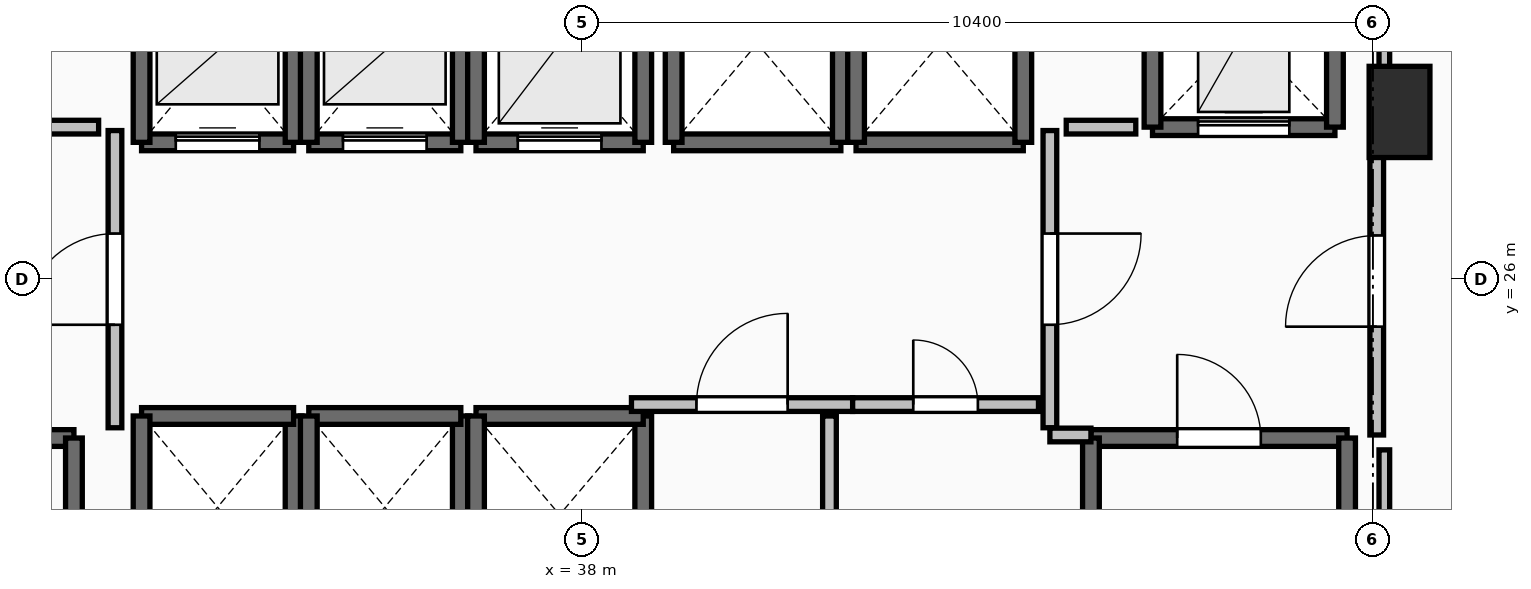
"""IFC4 building model, lengths in metres.
Left out: names, types, materials, properties, quantities, classifications, styles, units other than length and angle.
Written with IfcOpenShell. Run it as: python <this file> out.ifc"""

import sys

from ifc_helpers import new_model, si_unit, direction, frame, frame_2d, origin, origin_2d, place, context, subcontext, project, spatial, rectangle, extrude, element, fill, save


model = new_model("IFC4")
c1 = context("Model", 3, precision=1e-05, world=origin(), true_north=direction((0.0, 1.0)))
c2 = subcontext(c1, "Body", "Model", "MODEL_VIEW")
j1 = project(units=[si_unit("LENGTHUNIT", "METRE"), si_unit("PLANEANGLEUNIT", "RADIAN")], contexts=[c1])
p1 = place(None, origin())
s1 = spatial("IfcSite", under=j1, at=p1, CompositionType="ELEMENT")
p2 = place(p1, origin())
s2 = spatial("IfcBuilding", under=s1, at=p2, CompositionType="ELEMENT")
p3 = place(p2, frame((0.0, 0.0, 92.8)))
s3 = spatial("IfcBuildingStorey", under=s2, at=p3, CompositionType="ELEMENT", Elevation=92.8)
p4 = place(p3, frame((48.75, 28.2, 0.0), z_axis=(0.0, 0.0, 1.0), x_axis=(1.0, 0.0, 0.0)))
e1 = element("IfcColumn", 1, at=p4, inside=s3, PredefinedType="PILASTER", context=c2, shape_type="SweptSolid", body=[
    extrude(rectangle(XDim=0.8, YDim=1.2, at=origin_2d()), origin(), (0.0, 0.0, 1.0), 3.5),
])
p5 = place(p3, frame((27.94, 23.91, 0.0), z_axis=(0.0, 0.0, 1.0), x_axis=(1.0, 0.0, 0.0)))
e2 = element("IfcWall", 2, at=p5, inside=s3, PredefinedType="SOLIDWALL", context=c2, shape_type="SweptSolid", body=[
    extrude(rectangle(XDim=3.37, YDim=0.22, at=frame_2d((1.685, 0.0))), origin(), (0.0, 0.0, 1.0), 3.24),
])
p6 = place(p5, frame((1.135, 0.0, 0.0)))
e3 = element("IfcOpeningElement", 3, at=p6, cuts=e2, PredefinedType="OPENING", context=c2, shape_type="SweptSolid", body=[
    extrude(rectangle(XDim=1.1, YDim=2.15, at=frame_2d((0.55, 1.075))), frame((0.0, 0.125, 0.0), z_axis=(0.0, -1.0, 0.0), x_axis=(1.0, 0.0, 0.0)), (0.0, 0.0, 1.0), 0.25),
])
p7 = place(p3, frame((31.31, 23.91, 0.0), z_axis=(0.0, 0.0, 1.0), x_axis=(0.0, -1.0, 0.0)))
e4 = element("IfcWall", 4, at=p7, inside=s3, PredefinedType="SOLIDWALL", context=c2, shape_type="SweptSolid", body=[
    extrude(rectangle(XDim=7.42, YDim=0.22, at=frame_2d((3.71, 0.0))), origin(), (0.0, 0.0, 1.0), 3.24),
])
p8 = place(p3, frame((44.69, 23.91, 0.0), z_axis=(0.0, 0.0, 1.0), x_axis=(1.0, 0.0, 0.0)))
e5 = element("IfcWall", 5, at=p8, inside=s3, PredefinedType="SOLIDWALL", context=c2, shape_type="SweptSolid", body=[
    extrude(rectangle(XDim=3.37, YDim=0.22, at=frame_2d((1.685, 0.0))), origin(), (0.0, 0.0, 1.0), 3.24),
])
p9 = place(p8, frame((1.135, 0.0, 0.0)))
e6 = element("IfcOpeningElement", 6, at=p9, cuts=e5, PredefinedType="OPENING", context=c2, shape_type="SweptSolid", body=[
    extrude(rectangle(XDim=1.1, YDim=2.15, at=frame_2d((0.55, 1.075))), frame((0.0, 0.125, 0.0), z_axis=(0.0, -1.0, 0.0), x_axis=(1.0, 0.0, 0.0)), (0.0, 0.0, 1.0), 0.25),
])
for number, where, z_axis, x_axis in (
    (7, (48.06, 23.91, 0.0), (0.0, 0.0, 1.0), (0.0, -1.0, 0.0)),
    (8, (44.69, 16.49, 0.0), (0.0, 0.0, 1.0), (0.0, 1.0, 0.0)),
):
    element("IfcWall", number, at=place(p3, frame(where, z_axis=z_axis, x_axis=x_axis)), inside=s3, PredefinedType="SOLIDWALL", context=c2, shape_type="SweptSolid", body=[
        extrude(rectangle(XDim=7.42, YDim=0.22, at=frame_2d((3.71, 0.0))), origin(), (0.0, 0.0, 1.0), 3.24),
    ])
p10 = place(p3, frame((32.2, 27.8, 0.0), z_axis=(0.0, 0.0, 1.0), x_axis=(1.0, 0.0, 0.0)))
e9 = element("IfcWall", 9, at=p10, inside=s3, PredefinedType="SOLIDWALL", context=c2, shape_type="SweptSolid", body=[
    extrude(rectangle(XDim=2.0, YDim=0.22, at=frame_2d((1.0, 0.0))), origin(), (0.0, 0.0, 1.0), 3.24),
])
p11 = place(p10, frame((0.45, 0.0, 0.0)))
e10 = element("IfcOpeningElement", 10, at=p11, cuts=e9, PredefinedType="OPENING", context=c2, shape_type="SweptSolid", body=[
    extrude(rectangle(XDim=1.1, YDim=2.2, at=frame_2d((0.55, 1.1))), frame((0.0, 0.125, 0.0), z_axis=(0.0, -1.0, 0.0), x_axis=(1.0, 0.0, 0.0)), (0.0, 0.0, 1.0), 0.25),
])
for number, where, z_axis, x_axis in (
    (11, (34.2, 27.8, 0.0), (0.0, 0.0, 1.0), (0.0, 1.0, 0.0)),
    (12, (32.2, 30.2, 0.0), (0.0, 0.0, 1.0), (0.0, -1.0, 0.0)),
):
    element("IfcWall", number, at=place(p3, frame(where, z_axis=z_axis, x_axis=x_axis)), inside=s3, PredefinedType="SOLIDWALL", context=c2, shape_type="SweptSolid", body=[
        extrude(rectangle(XDim=2.4, YDim=0.22, at=frame_2d((1.2, 0.0))), origin(), (0.0, 0.0, 1.0), 3.24),
    ])
p12 = place(p3, frame((34.4, 27.8, 0.0), z_axis=(0.0, 0.0, 1.0), x_axis=(1.0, 0.0, 0.0)))
e13 = element("IfcWall", 13, at=p12, inside=s3, PredefinedType="SOLIDWALL", context=c2, shape_type="SweptSolid", body=[
    extrude(rectangle(XDim=2.0, YDim=0.22, at=frame_2d((1.0, 0.0))), origin(), (0.0, 0.0, 1.0), 3.24),
])
p13 = place(p12, frame((0.45, 0.0, 0.0)))
e14 = element("IfcOpeningElement", 14, at=p13, cuts=e13, PredefinedType="OPENING", context=c2, shape_type="SweptSolid", body=[
    extrude(rectangle(XDim=1.1, YDim=2.2, at=frame_2d((0.55, 1.1))), frame((0.0, 0.125, 0.0), z_axis=(0.0, -1.0, 0.0), x_axis=(1.0, 0.0, 0.0)), (0.0, 0.0, 1.0), 0.25),
])
for number, where, z_axis, x_axis in (
    (15, (36.4, 27.8, 0.0), (0.0, 0.0, 1.0), (0.0, 1.0, 0.0)),
    (16, (34.4, 30.2, 0.0), (0.0, 0.0, 1.0), (0.0, -1.0, 0.0)),
):
    element("IfcWall", number, at=place(p3, frame(where, z_axis=z_axis, x_axis=x_axis)), inside=s3, PredefinedType="SOLIDWALL", context=c2, shape_type="SweptSolid", body=[
        extrude(rectangle(XDim=2.4, YDim=0.22, at=frame_2d((1.2, 0.0))), origin(), (0.0, 0.0, 1.0), 3.24),
    ])
p14 = place(p3, frame((36.6, 27.8, 0.0), z_axis=(0.0, 0.0, 1.0), x_axis=(1.0, 0.0, 0.0)))
e17 = element("IfcWall", 17, at=p14, inside=s3, PredefinedType="SOLIDWALL", context=c2, shape_type="SweptSolid", body=[
    extrude(rectangle(XDim=2.2, YDim=0.22, at=frame_2d((1.1, 0.0))), origin(), (0.0, 0.0, 1.0), 3.24),
])
p15 = place(p14, frame((0.55, 0.0, 0.0)))
e18 = element("IfcOpeningElement", 18, at=p15, cuts=e17, PredefinedType="OPENING", context=c2, shape_type="SweptSolid", body=[
    extrude(rectangle(XDim=1.1, YDim=2.2, at=frame_2d((0.55, 1.1))), frame((0.0, 0.125, 0.0), z_axis=(0.0, -1.0, 0.0), x_axis=(1.0, 0.0, 0.0)), (0.0, 0.0, 1.0), 0.25),
])
for number, where, z_axis, x_axis in (
    (19, (38.8, 27.8, 0.0), (0.0, 0.0, 1.0), (0.0, 1.0, 0.0)),
    (20, (36.6, 30.4, 0.0), (0.0, 0.0, 1.0), (0.0, -1.0, 0.0)),
):
    element("IfcWall", number, at=place(p3, frame(where, z_axis=z_axis, x_axis=x_axis)), inside=s3, PredefinedType="SOLIDWALL", context=c2, shape_type="SweptSolid", body=[
        extrude(rectangle(XDim=2.6, YDim=0.22, at=frame_2d((1.3, 0.0))), origin(), (0.0, 0.0, 1.0), 3.24),
    ])
p16 = place(p3, frame((34.2, 21.8, 0.0), z_axis=(0.0, 0.0, 1.0), x_axis=(0.0, 1.0, 0.0)))
e21 = element("IfcWall", 21, at=p16, inside=s3, PredefinedType="SOLIDWALL", context=c2, shape_type="SweptSolid", body=[
    extrude(rectangle(XDim=2.4, YDim=0.22, at=frame_2d((1.2, 0.0))), origin(), (0.0, 0.0, 1.0), 3.24),
])
p17 = place(p3, frame((34.2, 24.2, 0.0), z_axis=(0.0, 0.0, 1.0), x_axis=(-1.0, 0.0, 0.0)))
e22 = element("IfcWall", 22, at=p17, inside=s3, PredefinedType="SOLIDWALL", context=c2, shape_type="SweptSolid", body=[
    extrude(rectangle(XDim=2.0, YDim=0.22, at=frame_2d((1.0, 0.0))), origin(), (0.0, 0.0, 1.0), 3.24),
])
for number, where, z_axis, x_axis in (
    (23, (32.2, 24.2, 0.0), (0.0, 0.0, 1.0), (0.0, -1.0, 0.0)),
    (24, (36.4, 21.8, 0.0), (0.0, 0.0, 1.0), (0.0, 1.0, 0.0)),
):
    element("IfcWall", number, at=place(p3, frame(where, z_axis=z_axis, x_axis=x_axis)), inside=s3, PredefinedType="SOLIDWALL", context=c2, shape_type="SweptSolid", body=[
        extrude(rectangle(XDim=2.4, YDim=0.22, at=frame_2d((1.2, 0.0))), origin(), (0.0, 0.0, 1.0), 3.24),
    ])
p18 = place(p3, frame((36.4, 24.2, 0.0), z_axis=(0.0, 0.0, 1.0), x_axis=(-1.0, 0.0, 0.0)))
e25 = element("IfcWall", 25, at=p18, inside=s3, PredefinedType="SOLIDWALL", context=c2, shape_type="SweptSolid", body=[
    extrude(rectangle(XDim=2.0, YDim=0.22, at=frame_2d((1.0, 0.0))), origin(), (0.0, 0.0, 1.0), 3.24),
])
p19 = place(p3, frame((34.4, 24.2, 0.0), z_axis=(0.0, 0.0, 1.0), x_axis=(0.0, -1.0, 0.0)))
e26 = element("IfcWall", 26, at=p19, inside=s3, PredefinedType="SOLIDWALL", context=c2, shape_type="SweptSolid", body=[
    extrude(rectangle(XDim=2.4, YDim=0.22, at=frame_2d((1.2, 0.0))), origin(), (0.0, 0.0, 1.0), 3.24),
])
p20 = place(p3, frame((38.8, 21.6, 0.0), z_axis=(0.0, 0.0, 1.0), x_axis=(0.0, 1.0, 0.0)))
e27 = element("IfcWall", 27, at=p20, inside=s3, PredefinedType="SOLIDWALL", context=c2, shape_type="SweptSolid", body=[
    extrude(rectangle(XDim=2.6, YDim=0.22, at=frame_2d((1.3, 0.0))), origin(), (0.0, 0.0, 1.0), 3.24),
])
p21 = place(p3, frame((38.8, 24.2, 0.0), z_axis=(0.0, 0.0, 1.0), x_axis=(-1.0, 0.0, 0.0)))
e28 = element("IfcWall", 28, at=p21, inside=s3, PredefinedType="SOLIDWALL", context=c2, shape_type="SweptSolid", body=[
    extrude(rectangle(XDim=2.2, YDim=0.22, at=frame_2d((1.1, 0.0))), origin(), (0.0, 0.0, 1.0), 3.24),
])
p22 = place(p3, frame((36.6, 24.2, 0.0), z_axis=(0.0, 0.0, 1.0), x_axis=(0.0, -1.0, 0.0)))
e29 = element("IfcWall", 29, at=p22, inside=s3, PredefinedType="SOLIDWALL", context=c2, shape_type="SweptSolid", body=[
    extrude(rectangle(XDim=2.6, YDim=0.22, at=frame_2d((1.3, 0.0))), origin(), (0.0, 0.0, 1.0), 3.24),
])
p23 = place(p3, frame((39.2, 27.8, 0.0), z_axis=(0.0, 0.0, 1.0), x_axis=(1.0, 0.0, 0.0)))
e30 = element("IfcWall", 30, at=p23, inside=s3, PredefinedType="SOLIDWALL", context=c2, shape_type="SweptSolid", body=[
    extrude(rectangle(XDim=2.2, YDim=0.22, at=frame_2d((1.1, 0.0))), origin(), (0.0, 0.0, 1.0), 3.24),
])
for number, where, z_axis, x_axis in (
    (31, (41.4, 27.8, 0.0), (0.0, 0.0, 1.0), (0.0, 1.0, 0.0)),
    (32, (39.2, 30.4, 0.0), (0.0, 0.0, 1.0), (0.0, -1.0, 0.0)),
):
    element("IfcWall", number, at=place(p3, frame(where, z_axis=z_axis, x_axis=x_axis)), inside=s3, PredefinedType="SOLIDWALL", context=c2, shape_type="SweptSolid", body=[
        extrude(rectangle(XDim=2.6, YDim=0.22, at=frame_2d((1.3, 0.0))), origin(), (0.0, 0.0, 1.0), 3.24),
    ])
p24 = place(p3, frame((41.6, 27.8, 0.0), z_axis=(0.0, 0.0, 1.0), x_axis=(1.0, 0.0, 0.0)))
e33 = element("IfcWall", 33, at=p24, inside=s3, PredefinedType="SOLIDWALL", context=c2, shape_type="SweptSolid", body=[
    extrude(rectangle(XDim=2.2, YDim=0.22, at=frame_2d((1.1, 0.0))), origin(), (0.0, 0.0, 1.0), 3.24),
])
for number, where, z_axis, x_axis in (
    (34, (43.8, 27.8, 0.0), (0.0, 0.0, 1.0), (0.0, 1.0, 0.0)),
    (35, (41.6, 30.4, 0.0), (0.0, 0.0, 1.0), (0.0, -1.0, 0.0)),
):
    element("IfcWall", number, at=place(p3, frame(where, z_axis=z_axis, x_axis=x_axis)), inside=s3, PredefinedType="SOLIDWALL", context=c2, shape_type="SweptSolid", body=[
        extrude(rectangle(XDim=2.6, YDim=0.22, at=frame_2d((1.3, 0.0))), origin(), (0.0, 0.0, 1.0), 3.24),
    ])
p25 = place(p3, frame((45.5, 28.0, 0.0), z_axis=(0.0, 0.0, 1.0), x_axis=(1.0, 0.0, 0.0)))
e36 = element("IfcWall", 36, at=p25, inside=s3, PredefinedType="SHEAR", context=c2, shape_type="SweptSolid", body=[
    extrude(rectangle(XDim=2.4, YDim=0.22, at=frame_2d((1.2, 0.0))), origin(), (0.0, 0.0, 1.0), 3.24),
])
p26 = place(p25, frame((0.6, 0.0, 0.0)))
e37 = element("IfcOpeningElement", 37, at=p26, cuts=e36, PredefinedType="OPENING", context=c2, shape_type="SweptSolid", body=[
    extrude(rectangle(XDim=1.2, YDim=2.2, at=frame_2d((0.6, 1.1))), frame((0.0, 0.125, 0.0), z_axis=(0.0, -1.0, 0.0), x_axis=(1.0, 0.0, 0.0)), (0.0, 0.0, 1.0), 0.25),
])
for number, where, z_axis, x_axis in (
    (38, (47.9, 28.0, 0.0), (0.0, 0.0, 1.0), (0.0, 1.0, 0.0)),
    (39, (45.5, 30.5, 0.0), (0.0, 0.0, 1.0), (0.0, -1.0, 0.0)),
):
    element("IfcWall", number, at=place(p3, frame(where, z_axis=z_axis, x_axis=x_axis)), inside=s3, PredefinedType="SHEAR", context=c2, shape_type="SweptSolid", body=[
        extrude(rectangle(XDim=2.5, YDim=0.22, at=frame_2d((1.25, 0.0))), origin(), (0.0, 0.0, 1.0), 3.24),
    ])
p27 = place(p3, frame((31.85, 24.045, 0.0), z_axis=(0.0, 0.0, 1.0), x_axis=(0.0, 1.0, 0.0)))
e40 = element("IfcWall", 40, at=p27, inside=s3, PredefinedType="PARTITIONING", context=c2, shape_type="SweptSolid", body=[
    extrude(rectangle(XDim=3.91, YDim=0.18, at=frame_2d((1.955, 0.0))), origin(), (0.0, 0.0, 1.0), 3.24),
])
p28 = place(p27, frame((1.355, 0.0, 0.0)))
e41 = element("IfcOpeningElement", 41, at=p28, cuts=e40, PredefinedType="OPENING", context=c2, shape_type="SweptSolid", body=[
    extrude(rectangle(XDim=1.2, YDim=2.15, at=frame_2d((0.6, 1.075))), frame((0.0, 0.105, 0.0), z_axis=(0.0, -1.0, 0.0), x_axis=(1.0, 0.0, 0.0)), (0.0, 0.0, 1.0), 0.21),
])
p29 = place(p3, frame((44.15, 27.955, 0.0), z_axis=(0.0, 0.0, 1.0), x_axis=(0.0, -1.0, 0.0)))
e42 = element("IfcWall", 42, at=p29, inside=s3, PredefinedType="PARTITIONING", context=c2, shape_type="SweptSolid", body=[
    extrude(rectangle(XDim=3.91, YDim=0.18, at=frame_2d((1.955, 0.0))), origin(), (0.0, 0.0, 1.0), 3.24),
])
p30 = place(p29, frame((1.355, 0.0, 0.0)))
e43 = element("IfcOpeningElement", 43, at=p30, cuts=e42, PredefinedType="OPENING", context=c2, shape_type="SweptSolid", body=[
    extrude(rectangle(XDim=1.2, YDim=2.15, at=frame_2d((0.6, 1.075))), frame((0.0, 0.105, 0.0), z_axis=(0.0, -1.0, 0.0), x_axis=(1.0, 0.0, 0.0)), (0.0, 0.0, 1.0), 0.21),
])
p31 = place(p3, frame((44.15, 23.95, 0.0), z_axis=(0.0, 0.0, 1.0), x_axis=(1.0, 0.0, 0.0)))
e44 = element("IfcWall", 44, at=p31, inside=s3, PredefinedType="PARTITIONING", context=c2, shape_type="SweptSolid", body=[
    extrude(rectangle(XDim=0.54, YDim=0.18, at=frame_2d((0.27, 0.0))), origin(), (0.0, 0.0, 1.0), 3.24),
])
p32 = place(p3, frame((48.45, 23.95, 0.0), z_axis=(0.0, 0.0, 1.0), x_axis=(0.0, 1.0, 0.0)))
e45 = element("IfcWall", 45, at=p32, inside=s3, PredefinedType="PARTITIONING", context=c2, shape_type="SweptSolid", body=[
    extrude(rectangle(XDim=4.05, YDim=0.18, at=frame_2d((2.025, 0.0))), origin(), (0.0, 0.0, 1.0), 3.24),
])
p33 = place(p32, frame((1.425, 0.0, 0.0)))
e46 = element("IfcOpeningElement", 46, at=p33, cuts=e45, PredefinedType="OPENING", context=c2, shape_type="SweptSolid", body=[
    extrude(rectangle(XDim=1.2, YDim=2.15, at=frame_2d((0.6, 1.075))), frame((0.0, 0.105, 0.0), z_axis=(0.0, -1.0, 0.0), x_axis=(1.0, 0.0, 0.0)), (0.0, 0.0, 1.0), 0.21),
])
p34 = place(p3, frame((38.645, 24.35, 0.0), z_axis=(0.0, 0.0, 1.0), x_axis=(1.0, 0.0, 0.0)))
e47 = element("IfcWall", 47, at=p34, inside=s3, PredefinedType="PARTITIONING", context=c2, shape_type="SweptSolid", body=[
    extrude(rectangle(XDim=2.91, YDim=0.18, at=frame_2d((1.455, 0.0))), origin(), (0.0, 0.0, 1.0), 3.24),
])
p35 = place(p34, frame((0.855, 0.0, 0.0)))
e48 = element("IfcOpeningElement", 48, at=p35, cuts=e47, PredefinedType="OPENING", context=c2, shape_type="SweptSolid", body=[
    extrude(rectangle(XDim=1.2, YDim=2.15, at=frame_2d((0.6, 1.075))), frame((0.0, 0.105, 0.0), z_axis=(0.0, -1.0, 0.0), x_axis=(1.0, 0.0, 0.0)), (0.0, 0.0, 1.0), 0.21),
])
p36 = place(p3, frame((41.555, 24.35, 0.0), z_axis=(0.0, 0.0, 1.0), x_axis=(1.0, 0.0, 0.0)))
e49 = element("IfcWall", 49, at=p36, inside=s3, PredefinedType="PARTITIONING", context=c2, shape_type="SweptSolid", body=[
    extrude(rectangle(XDim=2.445, YDim=0.18, at=frame_2d((1.223, 0.0))), origin(), (0.0, 0.0, 1.0), 3.24),
])
p37 = place(p36, frame((0.798, 0.0, 0.0)))
e50 = element("IfcOpeningElement", 50, at=p37, cuts=e49, PredefinedType="OPENING", context=c2, shape_type="SweptSolid", body=[
    extrude(rectangle(XDim=0.85, YDim=2.1, at=frame_2d((0.425, 1.05))), frame((0.0, 0.105, 0.0), z_axis=(0.0, -1.0, 0.0), x_axis=(1.0, 0.0, 0.0)), (0.0, 0.0, 1.0), 0.21),
])
p38 = place(p3, frame((41.25, 20.305, 0.0), z_axis=(0.0, 0.0, 1.0), x_axis=(0.0, 1.0, 0.0)))
e51 = element("IfcWall", 51, at=p38, inside=s3, PredefinedType="PARTITIONING", context=c2, shape_type="SweptSolid", body=[
    extrude(rectangle(XDim=3.895, YDim=0.18, at=frame_2d((1.948, 0.0))), origin(), (0.0, 0.0, 1.0), 3.24),
])
p39 = place(p38, frame((1.522, 0.0, 0.0)))
e52 = element("IfcOpeningElement", 52, at=p39, cuts=e51, PredefinedType="OPENING", context=c2, shape_type="SweptSolid", body=[
    extrude(rectangle(XDim=0.85, YDim=2.1, at=frame_2d((0.425, 1.05))), frame((0.0, 0.105, 0.0), z_axis=(0.0, -1.0, 0.0), x_axis=(1.0, 0.0, 0.0)), (0.0, 0.0, 1.0), 0.21),
])
for number, where, z_axis, x_axis in (
    (53, (31.635, 28.0, 0.0), (0.0, 0.0, 1.0), (-1.0, 0.0, 0.0)),
    (54, (45.28, 28.0, 0.0), (0.0, 0.0, 1.0), (-1.0, 0.0, 0.0)),
):
    element("IfcWall", number, at=place(p3, frame(where, z_axis=z_axis, x_axis=x_axis)), inside=s3, PredefinedType="PARTITIONING", context=c2, shape_type="SweptSolid", body=[
        extrude(rectangle(XDim=0.915, YDim=0.18, at=frame_2d((0.458, 0.0))), origin(), (0.0, 0.0, 1.0), 3.24),
    ])
p40 = place(p3, frame((48.55, 33.45, 0.0), z_axis=(0.0, 0.0, 1.0), x_axis=(0.0, -1.0, 0.0)))
e55 = element("IfcWall", 55, at=p40, inside=s3, PredefinedType="PARTITIONING", context=c2, shape_type="SweptSolid", body=[
    extrude(rectangle(XDim=5.254, YDim=0.14, at=frame_2d((2.627, 0.0))), origin(), (0.0, 0.0, 1.0), 2.432),
])
p41 = place(p3, frame((48.55, 23.754, 0.0), z_axis=(0.0, 0.0, 1.0), x_axis=(0.0, -1.0, 0.0)))
e56 = element("IfcWall", 56, at=p41, inside=s3, PredefinedType="PARTITIONING", context=c2, shape_type="SweptSolid", body=[
    extrude(rectangle(XDim=7.514, YDim=0.14, at=frame_2d((3.757, 0.0))), origin(), (0.0, 0.0, 1.0), 2.432),
])
p42 = place(p9, origin())
e57 = element("IfcDoor", 57, at=p42, inside=s3, OperationType="SINGLE_SWING_LEFT", PredefinedType="DOOR", context=c2, shape_type="SweptSolid", body=[
    extrude(rectangle(XDim=1.1, YDim=2.15, at=frame_2d((0.55, 1.075))), frame((0.0, 0.025, 0.0), z_axis=(0.0, -1.0, 0.0), x_axis=(1.0, 0.0, 0.0)), (0.0, 0.0, 1.0), 0.05),
])
fill(e6, e57)
p43 = place(p11, origin())
e58 = element("IfcDoor", 58, at=p43, inside=s3, OperationType="SLIDING_TO_LEFT", PredefinedType="DOOR", context=c2, shape_type="SweptSolid", body=[
    extrude(rectangle(XDim=1.1, YDim=2.2, at=frame_2d((0.55, 1.1))), frame((0.0, 0.025, 0.0), z_axis=(0.0, -1.0, 0.0), x_axis=(1.0, 0.0, 0.0)), (0.0, 0.0, 1.0), 0.05),
])
fill(e10, e58)
p44 = place(p13, origin())
e59 = element("IfcDoor", 59, at=p44, inside=s3, OperationType="SLIDING_TO_LEFT", PredefinedType="DOOR", context=c2, shape_type="SweptSolid", body=[
    extrude(rectangle(XDim=1.1, YDim=2.2, at=frame_2d((0.55, 1.1))), frame((0.0, 0.025, 0.0), z_axis=(0.0, -1.0, 0.0), x_axis=(1.0, 0.0, 0.0)), (0.0, 0.0, 1.0), 0.05),
])
fill(e14, e59)
p45 = place(p15, origin())
e60 = element("IfcDoor", 60, at=p45, inside=s3, OperationType="SLIDING_TO_LEFT", PredefinedType="DOOR", context=c2, shape_type="SweptSolid", body=[
    extrude(rectangle(XDim=1.1, YDim=2.2, at=frame_2d((0.55, 1.1))), frame((0.0, 0.025, 0.0), z_axis=(0.0, -1.0, 0.0), x_axis=(1.0, 0.0, 0.0)), (0.0, 0.0, 1.0), 0.05),
])
fill(e18, e60)
p46 = place(p26, origin())
e61 = element("IfcDoor", 61, at=p46, inside=s3, OperationType="SLIDING_TO_LEFT", PredefinedType="DOOR", context=c2, shape_type="SweptSolid", body=[
    extrude(rectangle(XDim=1.2, YDim=2.2, at=frame_2d((0.6, 1.1))), frame((0.0, 0.025, 0.0), z_axis=(0.0, -1.0, 0.0), x_axis=(1.0, 0.0, 0.0)), (0.0, 0.0, 1.0), 0.05),
])
fill(e37, e61)
p47 = place(p28, origin())
e62 = element("IfcDoor", 62, at=p47, inside=s3, OperationType="SINGLE_SWING_LEFT", PredefinedType="DOOR", context=c2, shape_type="SweptSolid", body=[
    extrude(rectangle(XDim=1.2, YDim=2.15, at=frame_2d((0.6, 1.075))), frame((0.0, 0.025, 0.0), z_axis=(0.0, -1.0, 0.0), x_axis=(1.0, 0.0, 0.0)), (0.0, 0.0, 1.0), 0.05),
])
fill(e41, e62)
p48 = place(p30, origin())
e63 = element("IfcDoor", 63, at=p48, inside=s3, OperationType="SINGLE_SWING_LEFT", PredefinedType="DOOR", context=c2, shape_type="SweptSolid", body=[
    extrude(rectangle(XDim=1.2, YDim=2.15, at=frame_2d((0.6, 1.075))), frame((0.0, 0.025, 0.0), z_axis=(0.0, -1.0, 0.0), x_axis=(1.0, 0.0, 0.0)), (0.0, 0.0, 1.0), 0.05),
])
fill(e43, e63)
p49 = place(p33, origin())
e64 = element("IfcDoor", 64, at=p49, inside=s3, OperationType="SINGLE_SWING_LEFT", PredefinedType="DOOR", context=c2, shape_type="SweptSolid", body=[
    extrude(rectangle(XDim=1.2, YDim=2.15, at=frame_2d((0.6, 1.075))), frame((0.0, 0.025, 0.0), z_axis=(0.0, -1.0, 0.0), x_axis=(1.0, 0.0, 0.0)), (0.0, 0.0, 1.0), 0.05),
])
fill(e46, e64)
p50 = place(p35, origin())
e65 = element("IfcDoor", 65, at=p50, inside=s3, OperationType="SINGLE_SWING_RIGHT", PredefinedType="DOOR", context=c2, shape_type="SweptSolid", body=[
    extrude(rectangle(XDim=1.2, YDim=2.15, at=frame_2d((0.6, 1.075))), frame((0.0, 0.025, 0.0), z_axis=(0.0, -1.0, 0.0), x_axis=(1.0, 0.0, 0.0)), (0.0, 0.0, 1.0), 0.05),
])
fill(e48, e65)
p51 = place(p37, origin())
e66 = element("IfcDoor", 66, at=p51, inside=s3, OperationType="SINGLE_SWING_LEFT", PredefinedType="DOOR", context=c2, shape_type="SweptSolid", body=[
    extrude(rectangle(XDim=0.85, YDim=2.1, at=frame_2d((0.425, 1.05))), frame((0.0, 0.025, 0.0), z_axis=(0.0, -1.0, 0.0), x_axis=(1.0, 0.0, 0.0)), (0.0, 0.0, 1.0), 0.05),
])
fill(e50, e66)
save(model, sys.argv[1])
